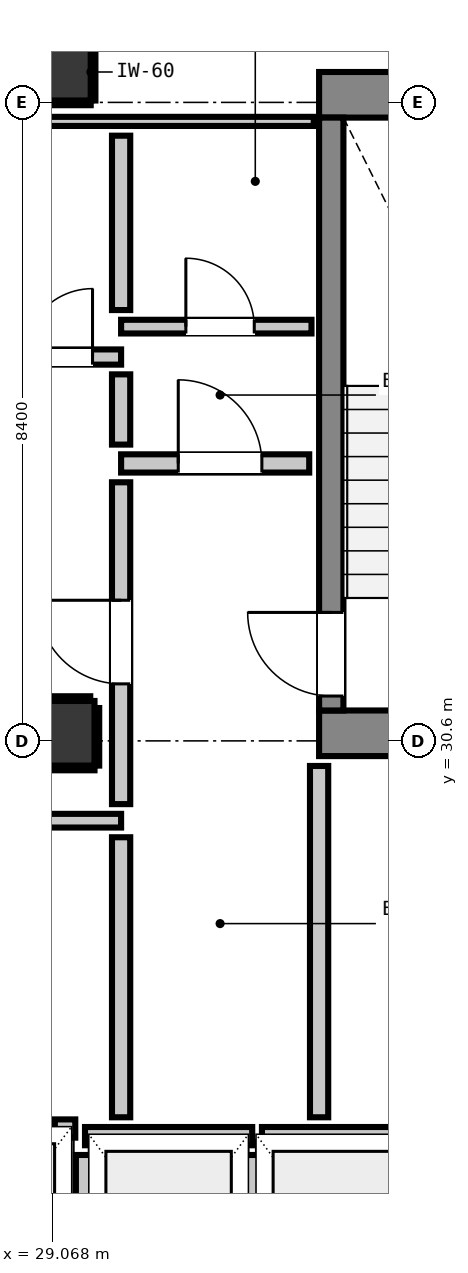
"""IFC4 building model, lengths in metres.
Left out: names, types, materials, properties, quantities, classifications, styles, units other than length and angle.
Written with IfcOpenShell. Run it as: python <this file> out.ifc"""

import sys

from ifc_helpers import new_model, si_unit, direction, frame, frame_2d, origin, origin_2d, place, context, subcontext, project, spatial, rectangle, extrude, element, fill, save


model = new_model("IFC4")
c1 = context("Model", 3, precision=1e-05, world=origin(), true_north=direction((0.0, 1.0)))
c2 = subcontext(c1, "Body", "Model", "MODEL_VIEW")
j1 = project(units=[si_unit("LENGTHUNIT", "METRE"), si_unit("PLANEANGLEUNIT", "RADIAN")], contexts=[c1])
p1 = place(None, origin())
s1 = spatial("IfcSite", under=j1, at=p1, CompositionType="ELEMENT")
p2 = place(p1, origin())
s2 = spatial("IfcBuilding", under=s1, at=p2, CompositionType="ELEMENT")
p3 = place(p2, frame((0.0, 0.0, 262.24)))
s3 = spatial("IfcBuildingStorey", under=s2, at=p3, CompositionType="ELEMENT", Elevation=262.24)
p4 = place(p3, frame((29.2, 39.4, 0.0), z_axis=(0.0, 0.0, 1.0), x_axis=(1.0, 0.0, 0.0)))
e1 = element("IfcColumn", 1, at=p4, inside=s3, PredefinedType="COLUMN", context=c2, shape_type="SweptSolid", body=[
    extrude(rectangle(XDim=0.75, YDim=0.75, at=origin_2d()), origin(), (0.0, 0.0, 1.0), 3.32),
])
p5 = place(p3, frame((32.58, 39.1, 0.0), z_axis=(0.0, 0.0, 1.0), x_axis=(1.0, 0.0, 0.0)))
e2 = element("IfcWall", 2, at=p5, inside=s3, PredefinedType="SHEAR", context=c2, shape_type="SweptSolid", body=[
    extrude(rectangle(XDim=4.08, YDim=0.6, at=frame_2d((2.04, 0.0))), origin(), (0.0, 0.0, 1.0), 3.32),
])
p6 = place(p3, frame((32.58, 30.7, 0.0), z_axis=(0.0, 0.0, 1.0), x_axis=(1.0, 0.0, 0.0)))
e3 = element("IfcWall", 3, at=p6, inside=s3, PredefinedType="SHEAR", context=c2, shape_type="SweptSolid", body=[
    extrude(rectangle(XDim=3.54, YDim=0.6, at=frame_2d((1.77, 0.0))), origin(), (0.0, 0.0, 1.0), 3.32),
])
p7 = place(p3, frame((32.74, 31.0, 0.0), z_axis=(0.0, 0.0, 1.0), x_axis=(0.0, 1.0, 0.0)))
e4 = element("IfcWall", 4, at=p7, inside=s3, PredefinedType="SHEAR", context=c2, shape_type="SweptSolid", body=[
    extrude(rectangle(XDim=7.8, YDim=0.32, at=frame_2d((3.9, 0.0))), origin(), (0.0, 0.0, 1.0), 3.32),
])
p8 = place(p7, frame((0.19, 0.0, 0.0)))
e5 = element("IfcOpeningElement", 5, at=p8, cuts=e4, PredefinedType="OPENING", context=c2, shape_type="SweptSolid", body=[
    extrude(rectangle(XDim=1.1, YDim=2.15, at=frame_2d((0.55, 1.075))), frame((0.0, 0.17, 0.0), z_axis=(0.0, -1.0, 0.0), x_axis=(1.0, 0.0, 0.0)), (0.0, 0.0, 1.0), 0.34),
])
p9 = place(p3, frame((29.2, 30.7, 0.0), z_axis=(0.0, 0.0, 1.0), x_axis=(1.0, 0.0, 0.0)))
e6 = element("IfcColumn", 6, at=p9, inside=s3, PredefinedType="COLUMN", context=c2, shape_type="SweptSolid", body=[
    extrude(rectangle(XDim=0.85, YDim=0.85, at=origin_2d()), origin(), (0.0, 0.0, 1.0), 3.32),
])
p10 = place(p3, frame((29.5, 25.4, 0.0), z_axis=(0.0, 0.0, 1.0), x_axis=(1.0, 0.0, 0.0)))
e7 = element("IfcWall", 7, at=p10, inside=s3, PredefinedType="PARTITIONING", context=c2, shape_type="SweptSolid", body=[
    extrude(rectangle(XDim=2.2, YDim=0.24, at=frame_2d((1.1, 0.0))), origin(), (0.0, 0.0, 1.0), 3.1),
])
p11 = place(p3, frame((29.5, 22.848, 0.0), z_axis=(0.0, 0.0, 1.0), x_axis=(0.0, 1.0, 0.0)))
e8 = element("IfcWall", 8, at=p11, inside=s3, PredefinedType="PARTITIONING", context=c2, shape_type="SweptSolid", body=[
    extrude(rectangle(XDim=2.304, YDim=0.24, at=frame_2d((1.152, 0.0))), origin(), (0.0, 0.0, 1.0), 2.335),
])
p12 = place(p3, frame((31.7, 22.848, 0.0), z_axis=(0.0, 0.0, 1.0), x_axis=(0.0, 1.0, 0.0)))
e9 = element("IfcWall", 9, at=p12, inside=s3, PredefinedType="PARTITIONING", context=c2, shape_type="SweptSolid", body=[
    extrude(rectangle(XDim=2.304, YDim=0.24, at=frame_2d((1.152, 0.0))), origin(), (0.0, 0.0, 1.0), 3.1),
])
p13 = place(p3, frame((31.828, 25.4, 0.0), z_axis=(0.0, 0.0, 1.0), x_axis=(1.0, 0.0, 0.0)))
e10 = element("IfcWall", 10, at=p13, inside=s3, PredefinedType="PARTITIONING", context=c2, shape_type="SweptSolid", body=[
    extrude(rectangle(XDim=2.072, YDim=0.24, at=frame_2d((1.036, 0.0))), origin(), (0.0, 0.0, 1.0), 3.1),
])
p14 = place(p3, frame((29.103, 25.5, 0.0), z_axis=(0.0, 0.0, 1.0), x_axis=(1.0, 0.0, 0.0)))
e11 = element("IfcWall", 11, at=p14, inside=s3, PredefinedType="PARTITIONING", context=c2, shape_type="SweptSolid", body=[
    extrude(rectangle(XDim=0.269, YDim=0.24, at=frame_2d((0.135, 0.0))), origin(), (0.0, 0.0, 1.0), 3.1),
])
p15 = place(p3, frame((29.975, 34.25, 0.0), z_axis=(0.0, 0.0, 1.0), x_axis=(1.0, 0.0, 0.0)))
e12 = element("IfcWall", 12, at=p15, inside=s3, PredefinedType="PARTITIONING", context=c2, shape_type="SweptSolid", body=[
    extrude(rectangle(XDim=2.475, YDim=0.24, at=frame_2d((1.237, 0.0))), origin(), (0.0, 0.0, 1.0), 3.1),
])
p16 = place(p15, frame((0.752, 0.0, 0.0)))
e13 = element("IfcOpeningElement", 13, at=p16, cuts=e12, PredefinedType="OPENING", context=c2, shape_type="SweptSolid", body=[
    extrude(rectangle(XDim=1.1, YDim=2.15, at=frame_2d((0.55, 1.075))), frame((0.0, 0.13, 0.0), z_axis=(0.0, -1.0, 0.0), x_axis=(1.0, 0.0, 0.0)), (0.0, 0.0, 1.0), 0.26),
])
p17 = place(p3, frame((18.95, 35.65, 0.0), z_axis=(0.0, 0.0, 1.0), x_axis=(1.0, 0.0, 0.0)))
e14 = element("IfcWall", 14, at=p17, inside=s3, PredefinedType="PARTITIONING", context=c2, shape_type="SweptSolid", body=[
    extrude(rectangle(XDim=11.025, YDim=0.2, at=frame_2d((5.513, 0.0))), origin(), (0.0, 0.0, 1.0), 3.1),
])
p18 = place(p17, frame((9.749, 0.0, 0.0)))
e15 = element("IfcOpeningElement", 15, at=p18, cuts=e14, PredefinedType="OPENING", context=c2, shape_type="SweptSolid", body=[
    extrude(rectangle(XDim=0.9, YDim=2.1, at=frame_2d((0.45, 1.05))), frame((0.0, 0.11, 0.0), z_axis=(0.0, -1.0, 0.0), x_axis=(1.0, 0.0, 0.0)), (0.0, 0.0, 1.0), 0.22),
])
p19 = place(p3, frame((28.593, 29.55, 0.0), z_axis=(0.0, 0.0, 1.0), x_axis=(1.0, 0.0, 0.0)))
e16 = element("IfcWall", 16, at=p19, inside=s3, PredefinedType="PARTITIONING", context=c2, shape_type="SweptSolid", body=[
    extrude(rectangle(XDim=1.382, YDim=0.18, at=frame_2d((0.691, 0.0))), origin(), (0.0, 0.0, 1.0), 3.1),
])
p20 = place(p3, frame((29.975, 36.05, 0.0), z_axis=(0.0, 0.0, 1.0), x_axis=(1.0, 0.0, 0.0)))
e17 = element("IfcWall", 17, at=p20, inside=s3, PredefinedType="PARTITIONING", context=c2, shape_type="SweptSolid", body=[
    extrude(rectangle(XDim=2.505, YDim=0.18, at=frame_2d((1.252, 0.0))), origin(), (0.0, 0.0, 1.0), 3.1),
])
p21 = place(p20, frame((0.852, 0.0, 0.0)))
e18 = element("IfcOpeningElement", 18, at=p21, cuts=e17, PredefinedType="OPENING", context=c2, shape_type="SweptSolid", body=[
    extrude(rectangle(XDim=0.9, YDim=2.1, at=frame_2d((0.45, 1.05))), frame((0.0, 0.1, 0.0), z_axis=(0.0, -1.0, 0.0), x_axis=(1.0, 0.0, 0.0)), (0.0, 0.0, 1.0), 0.2),
])
p22 = place(p3, frame((18.95, 38.75, 0.0), z_axis=(0.0, 0.0, 1.0), x_axis=(1.0, 0.0, 0.0)))
e19 = element("IfcWall", 19, at=p22, inside=s3, PredefinedType="PARTITIONING", context=c2, shape_type="SweptSolid", body=[
    extrude(rectangle(XDim=13.56, YDim=0.12, at=frame_2d((6.78, 0.0))), origin(), (0.0, 0.0, 1.0), 3.1),
])
p23 = place(p3, frame((29.975, 25.648, 0.0), z_axis=(0.0, 0.0, 1.0), x_axis=(0.0, 1.0, 0.0)))
e20 = element("IfcWall", 20, at=p23, inside=s3, PredefinedType="PARTITIONING", context=c2, shape_type="SweptSolid", body=[
    extrude(rectangle(XDim=3.684, YDim=0.24, at=frame_2d((1.842, 0.0))), origin(), (0.0, 0.0, 1.0), 3.1),
])
p24 = place(p3, frame((29.975, 29.768, 0.0), z_axis=(0.0, 0.0, 1.0), x_axis=(0.0, 1.0, 0.0)))
e21 = element("IfcWall", 21, at=p24, inside=s3, PredefinedType="PARTITIONING", context=c2, shape_type="SweptSolid", body=[
    extrude(rectangle(XDim=4.234, YDim=0.24, at=frame_2d((2.117, 0.0))), origin(), (0.0, 0.0, 1.0), 3.1),
])
p25 = place(p24, frame((1.582, 0.0, 0.0)))
e22 = element("IfcOpeningElement", 22, at=p25, cuts=e21, PredefinedType="OPENING", context=c2, shape_type="SweptSolid", body=[
    extrude(rectangle(XDim=1.1, YDim=2.15, at=frame_2d((0.55, 1.075))), frame((0.0, 0.13, 0.0), z_axis=(0.0, -1.0, 0.0), x_axis=(1.0, 0.0, 0.0)), (0.0, 0.0, 1.0), 0.26),
])
p26 = place(p3, frame((29.975, 34.498, 0.0), z_axis=(0.0, 0.0, 1.0), x_axis=(0.0, 1.0, 0.0)))
e23 = element("IfcWall", 23, at=p26, inside=s3, PredefinedType="PARTITIONING", context=c2, shape_type="SweptSolid", body=[
    extrude(rectangle(XDim=0.924, YDim=0.24, at=frame_2d((0.462, 0.0))), origin(), (0.0, 0.0, 1.0), 3.1),
])
p27 = place(p3, frame((29.975, 36.268, 0.0), z_axis=(0.0, 0.0, 1.0), x_axis=(0.0, 1.0, 0.0)))
e24 = element("IfcWall", 24, at=p27, inside=s3, PredefinedType="PARTITIONING", context=c2, shape_type="SweptSolid", body=[
    extrude(rectangle(XDim=2.294, YDim=0.24, at=frame_2d((1.147, 0.0))), origin(), (0.0, 0.0, 1.0), 3.1),
])
p28 = place(p3, frame((32.58, 25.648, 0.0), z_axis=(0.0, 0.0, 1.0), x_axis=(0.0, 1.0, 0.0)))
e25 = element("IfcWall", 25, at=p28, inside=s3, PredefinedType="PARTITIONING", context=c2, shape_type="SweptSolid", body=[
    extrude(rectangle(XDim=4.622, YDim=0.24, at=frame_2d((2.311, 0.0))), origin(), (0.0, 0.0, 1.0), 3.1),
])
p29 = place(p3, frame((28.833, 38.993, 0.0), z_axis=(0.0, 0.0, 1.0), x_axis=(1.0, 0.0, 0.0)))
e26 = element("IfcWall", 26, at=p29, inside=s3, PredefinedType="PARTITIONING", context=c2, shape_type="SweptSolid", body=[
    extrude(rectangle(XDim=0.742, YDim=0.06, at=frame_2d((0.371, 0.0))), origin(), (0.0, 0.0, 1.0), 1.45),
])
p30 = place(p3, frame((29.607, 39.025, 0.0), z_axis=(0.0, 0.0, 1.0), x_axis=(0.0, 1.0, 0.0)))
e27 = element("IfcWall", 27, at=p30, inside=s3, PredefinedType="PARTITIONING", context=c2, shape_type="SweptSolid", body=[
    extrude(rectangle(XDim=0.75, YDim=0.06, at=frame_2d((0.375, 0.0))), origin(), (0.0, 0.0, 1.0), 1.45),
])
p31 = place(p3, frame((28.775, 30.243, 0.0), z_axis=(0.0, 0.0, 1.0), x_axis=(1.0, 0.0, 0.0)))
e28 = element("IfcWall", 28, at=p31, inside=s3, PredefinedType="PARTITIONING", context=c2, shape_type="SweptSolid", body=[
    extrude(rectangle(XDim=0.85, YDim=0.06, at=frame_2d((0.425, 0.0))), origin(), (0.0, 0.0, 1.0), 1.45),
])
p32 = place(p3, frame((28.775, 31.157, 0.0), z_axis=(0.0, 0.0, 1.0), x_axis=(1.0, 0.0, 0.0)))
e29 = element("IfcWall", 29, at=p32, inside=s3, PredefinedType="PARTITIONING", context=c2, shape_type="SweptSolid", body=[
    extrude(rectangle(XDim=0.794, YDim=0.06, at=frame_2d((0.397, 0.0))), origin(), (0.0, 0.0, 1.0), 1.45),
])
p33 = place(p3, frame((29.657, 30.275, 0.0), z_axis=(0.0, 0.0, 1.0), x_axis=(0.0, 1.0, 0.0)))
e30 = element("IfcWall", 30, at=p33, inside=s3, PredefinedType="PARTITIONING", context=c2, shape_type="SweptSolid", body=[
    extrude(rectangle(XDim=0.757, YDim=0.06, at=frame_2d((0.378, 0.0))), origin(), (0.0, 0.0, 1.0), 1.45),
])
p34 = place(p8, origin())
e31 = element("IfcDoor", 31, at=p34, inside=s3, OperationType="SINGLE_SWING_RIGHT", PredefinedType="DOOR", context=c2, shape_type="SweptSolid", body=[
    extrude(rectangle(XDim=1.1, YDim=2.15, at=frame_2d((0.55, 1.075))), frame((0.0, 0.025, 0.0), z_axis=(0.0, -1.0, 0.0), x_axis=(1.0, 0.0, 0.0)), (0.0, 0.0, 1.0), 0.05),
])
fill(e5, e31)
p35 = place(p25, origin())
e32 = element("IfcDoor", 32, at=p35, inside=s3, OperationType="SINGLE_SWING_RIGHT", PredefinedType="DOOR", context=c2, shape_type="SweptSolid", body=[
    extrude(rectangle(XDim=1.1, YDim=2.15, at=frame_2d((0.55, 1.075))), frame((0.0, 0.025, 0.0), z_axis=(0.0, -1.0, 0.0), x_axis=(1.0, 0.0, 0.0)), (0.0, 0.0, 1.0), 0.05),
])
fill(e22, e32)
p36 = place(p16, origin())
e33 = element("IfcDoor", 33, at=p36, inside=s3, OperationType="SINGLE_SWING_LEFT", PredefinedType="DOOR", context=c2, shape_type="SweptSolid", body=[
    extrude(rectangle(XDim=1.1, YDim=2.15, at=frame_2d((0.55, 1.075))), frame((0.0, 0.025, 0.0), z_axis=(0.0, -1.0, 0.0), x_axis=(1.0, 0.0, 0.0)), (0.0, 0.0, 1.0), 0.05),
])
fill(e13, e33)
p37 = place(p21, origin())
e34 = element("IfcDoor", 34, at=p37, inside=s3, OperationType="SINGLE_SWING_LEFT", PredefinedType="DOOR", context=c2, shape_type="SweptSolid", body=[
    extrude(rectangle(XDim=0.9, YDim=2.1, at=frame_2d((0.45, 1.05))), frame((0.0, 0.025, 0.0), z_axis=(0.0, -1.0, 0.0), x_axis=(1.0, 0.0, 0.0)), (0.0, 0.0, 1.0), 0.05),
])
fill(e18, e34)
p38 = place(p18, origin())
e35 = element("IfcDoor", 35, at=p38, inside=s3, OperationType="SINGLE_SWING_RIGHT", PredefinedType="DOOR", context=c2, shape_type="SweptSolid", body=[
    extrude(rectangle(XDim=0.9, YDim=2.1, at=frame_2d((0.45, 1.05))), frame((0.0, 0.025, 0.0), z_axis=(0.0, -1.0, 0.0), x_axis=(1.0, 0.0, 0.0)), (0.0, 0.0, 1.0), 0.05),
])
fill(e15, e35)
save(model, sys.argv[1])
